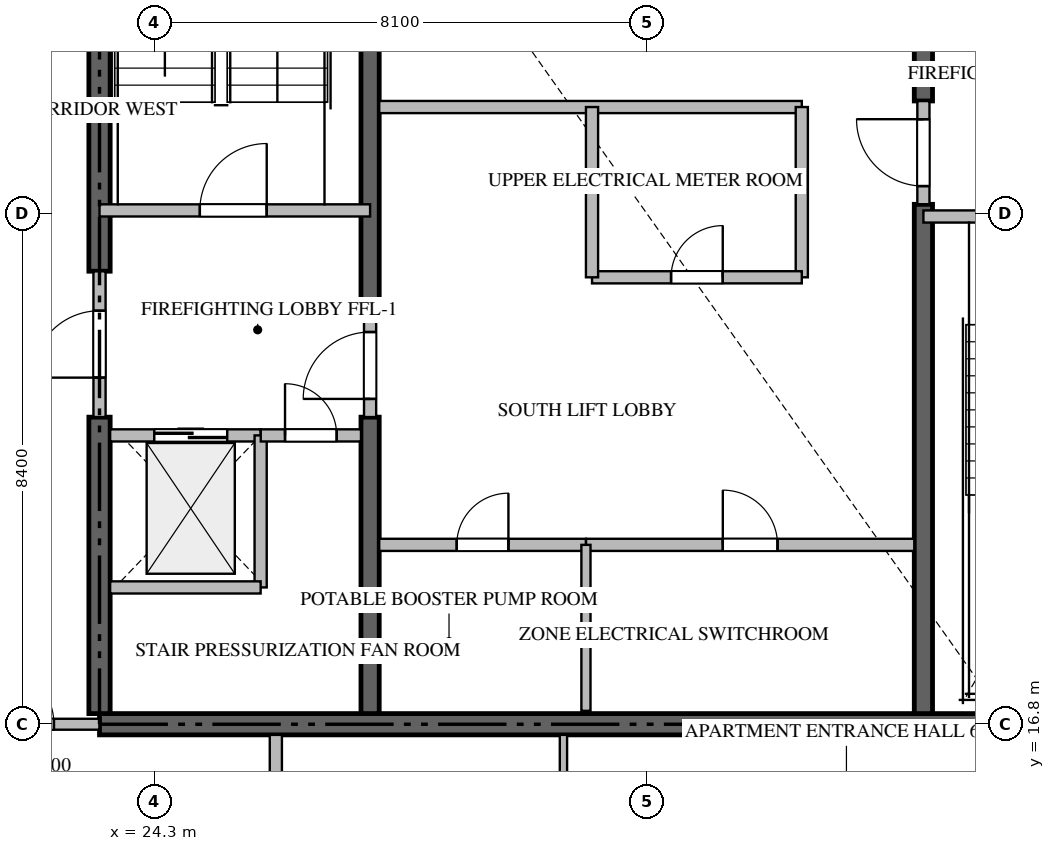
"""IFC4 building model, lengths in metres.
Left out: names, types, materials, properties, quantities, classifications, styles, units other than length and angle.
Written with IfcOpenShell. Run it as: python <this file> out.ifc"""

import sys

from ifc_helpers import new_model, si_unit, direction, frame, frame_2d, origin, place, context, subcontext, project, spatial, rectangle, extrude, source, transform, mapped, element, fill, save


model = new_model("IFC4")
c1 = context("Model", 3, precision=1e-05, world=origin(), true_north=direction((0.0, 1.0)))
c2 = subcontext(c1, "Body", "Model", "MODEL_VIEW")
j1 = project(units=[si_unit("LENGTHUNIT", "METRE"), si_unit("PLANEANGLEUNIT", "RADIAN")], contexts=[c1])
p1 = place(None, origin())
s1 = spatial("IfcSite", under=j1, at=p1, CompositionType="ELEMENT")
p2 = place(p1, origin())
s2 = spatial("IfcBuilding", under=s1, at=p2, CompositionType="ELEMENT")
p3 = place(p2, frame((0.0, 0.0, 241.25)))
s3 = spatial("IfcBuildingStorey", under=s2, at=p3, CompositionType="ELEMENT", Elevation=241.25)
p4 = place(p3, frame((23.4, 16.8, -0.26), z_axis=(0.0, 0.0, 1.0), x_axis=(1.0, 0.0, 0.0)))
e1 = element("IfcWall", 1, at=p4, inside=s3, PredefinedType="SHEAR", context=c2, shape_type="SweptSolid", body=[
    extrude(rectangle(XDim=18.0, YDim=0.35, at=frame_2d((9.0, 0.0))), origin(), (0.0, 0.0, 1.0), 3.848),
])
p5 = place(p3, frame((23.4, 16.975, -0.26), z_axis=(0.0, 0.0, 1.0), x_axis=(0.0, 1.0, 0.0)))
e2 = element("IfcWall", 2, at=p5, inside=s3, PredefinedType="SHEAR", context=c2, shape_type="SweptSolid", body=[
    extrude(rectangle(XDim=4.875, YDim=0.35, at=frame_2d((2.438, 0.0))), origin(), (0.0, 0.0, 1.0), 3.848),
])
p6 = place(p3, frame((23.4, 24.25, -0.26), z_axis=(0.0, 0.0, 1.0), x_axis=(0.0, 1.0, 0.0)))
e3 = element("IfcWall", 3, at=p6, inside=s3, PredefinedType="SHEAR", context=c2, shape_type="SweptSolid", body=[
    extrude(rectangle(XDim=9.175, YDim=0.35, at=frame_2d((4.587, 0.0))), origin(), (0.0, 0.0, 1.0), 3.848),
])
p7 = place(p3, frame((27.85, 16.975, -0.26), z_axis=(0.0, 0.0, 1.0), x_axis=(0.0, 1.0, 0.0)))
e4 = element("IfcWall", 4, at=p7, inside=s3, PredefinedType="SHEAR", context=c2, shape_type="SweptSolid", body=[
    extrude(rectangle(XDim=4.875, YDim=0.3, at=frame_2d((2.438, 0.0))), origin(), (0.0, 0.0, 1.0), 3.848),
])
p8 = place(p3, frame((27.85, 23.55, -0.26), z_axis=(0.0, 0.0, 1.0), x_axis=(0.0, 1.0, 0.0)))
e5 = element("IfcWall", 5, at=p8, inside=s3, PredefinedType="SHEAR", context=c2, shape_type="SweptSolid", body=[
    extrude(rectangle(XDim=9.875, YDim=0.3, at=frame_2d((4.938, 0.0))), origin(), (0.0, 0.0, 1.0), 3.848),
])
p9 = place(p3, frame((36.95, 16.975, -0.26), z_axis=(0.0, 0.0, 1.0), x_axis=(0.0, 1.0, 0.0)))
e6 = element("IfcWall", 6, at=p9, inside=s3, PredefinedType="SHEAR", context=c2, shape_type="SweptSolid", body=[
    extrude(rectangle(XDim=8.375, YDim=0.3, at=frame_2d((4.188, 0.0))), origin(), (0.0, 0.0, 1.0), 3.848),
])
p10 = place(p3, frame((36.95, 27.05, -0.26), z_axis=(0.0, 0.0, 1.0), x_axis=(0.0, 1.0, 0.0)))
e7 = element("IfcWall", 7, at=p10, inside=s3, PredefinedType="SHEAR", context=c2, shape_type="SweptSolid", body=[
    extrude(rectangle(XDim=6.375, YDim=0.3, at=frame_2d((3.188, 0.0))), origin(), (0.0, 0.0, 1.0), 3.848),
])
p11 = place(p3, frame((23.4, 25.25, 0.0), z_axis=(0.0, 0.0, 1.0), x_axis=(1.0, 0.0, 0.0)))
e8 = element("IfcWall", 8, at=p11, inside=s3, PredefinedType="STANDARD", context=c2, shape_type="SweptSolid", body=[
    extrude(rectangle(XDim=4.45, YDim=0.2, at=frame_2d((2.225, 0.0))), origin(), (0.0, 0.0, 1.0), 3.59),
])
p12 = place(p11, frame((1.65, 0.0, 0.0)))
e9 = element("IfcOpeningElement", 9, at=p12, cuts=e8, PredefinedType="OPENING", context=c2, shape_type="SweptSolid", body=[
    extrude(rectangle(XDim=1.1, YDim=2.15, at=frame_2d((0.55, 1.075))), frame((0.0, 0.11, 0.0), z_axis=(0.0, -1.0, 0.0), x_axis=(1.0, 0.0, 0.0)), (0.0, 0.0, 1.0), 0.22),
])
p13 = place(p3, frame((36.95, 25.15, 0.0), z_axis=(0.0, 0.0, 1.0), x_axis=(1.0, 0.0, 0.0)))
e10 = element("IfcWall", 10, at=p13, inside=s3, PredefinedType="STANDARD", context=c2, shape_type="SweptSolid", body=[
    extrude(rectangle(XDim=4.45, YDim=0.2, at=frame_2d((2.225, 0.0))), origin(), (0.0, 0.0, 1.0), 3.59),
])
p14 = place(p13, frame((1.65, 0.0, 0.0)))
e11 = element("IfcOpeningElement", 11, at=p14, cuts=e10, PredefinedType="OPENING", context=c2, shape_type="SweptSolid", body=[
    extrude(rectangle(XDim=1.1, YDim=2.15, at=frame_2d((0.55, 1.075))), frame((0.0, 0.11, 0.0), z_axis=(0.0, -1.0, 0.0), x_axis=(1.0, 0.0, 0.0)), (0.0, 0.0, 1.0), 0.22),
])
p15 = place(p3, frame((23.575, 21.55, 0.0), z_axis=(0.0, 0.0, 1.0), x_axis=(1.0, 0.0, 0.0)))
e12 = element("IfcWall", 12, at=p15, inside=s3, PredefinedType="STANDARD", context=c2, shape_type="SweptSolid", body=[
    extrude(rectangle(XDim=2.475, YDim=0.2, at=frame_2d((1.238, 0.0))), origin(), (0.0, 0.0, 1.0), 3.59),
])
p16 = place(p15, frame((0.725, 0.0, 0.0)))
e13 = element("IfcOpeningElement", 13, at=p16, cuts=e12, PredefinedType="OPENING", context=c2, shape_type="SweptSolid", body=[
    extrude(rectangle(XDim=1.2, YDim=2.2, at=frame_2d((0.6, 1.1))), frame((0.0, 0.11, 0.0), z_axis=(0.0, -1.0, 0.0), x_axis=(1.0, 0.0, 0.0)), (0.0, 0.0, 1.0), 0.22),
])
p17 = place(p3, frame((26.05, 19.05, 0.0), z_axis=(0.0, 0.0, 1.0), x_axis=(0.0, 1.0, 0.0)))
e14 = element("IfcWall", 14, at=p17, inside=s3, PredefinedType="STANDARD", context=c2, shape_type="SweptSolid", body=[
    extrude(rectangle(XDim=2.5, YDim=0.2, at=frame_2d((1.25, 0.0))), origin(), (0.0, 0.0, 1.0), 3.59),
])
p18 = place(p3, frame((23.575, 19.05, 0.0), z_axis=(0.0, 0.0, 1.0), x_axis=(1.0, 0.0, 0.0)))
e15 = element("IfcWall", 15, at=p18, inside=s3, PredefinedType="STANDARD", context=c2, shape_type="SweptSolid", body=[
    extrude(rectangle(XDim=2.475, YDim=0.2, at=frame_2d((1.238, 0.0))), origin(), (0.0, 0.0, 1.0), 3.59),
])
p19 = place(p3, frame((26.052, 21.55, 0.0), z_axis=(0.0, 0.0, 1.0), x_axis=(1.0, 0.0, 0.0)))
e16 = element("IfcWall", 16, at=p19, inside=s3, PredefinedType="STANDARD", context=c2, shape_type="SweptSolid", body=[
    extrude(rectangle(XDim=1.648, YDim=0.2, at=frame_2d((0.824, 0.0))), origin(), (0.0, 0.0, 1.0), 3.59),
])
p20 = place(p19, frame((0.399, 0.0, 0.0)))
e17 = element("IfcOpeningElement", 17, at=p20, cuts=e16, PredefinedType="OPENING", context=c2, shape_type="SweptSolid", body=[
    extrude(rectangle(XDim=0.85, YDim=2.1, at=frame_2d((0.425, 1.05))), frame((0.0, 0.11, 0.0), z_axis=(0.0, -1.0, 0.0), x_axis=(1.0, 0.0, 0.0)), (0.0, 0.0, 1.0), 0.22),
])
p21 = place(p3, frame((23.4, 21.852, 0.0), z_axis=(0.0, 0.0, 1.0), x_axis=(0.0, 1.0, 0.0)))
e18 = element("IfcWall", 18, at=p21, inside=s3, PredefinedType="STANDARD", context=c2, shape_type="SweptSolid", body=[
    extrude(rectangle(XDim=2.396, YDim=0.2, at=frame_2d((1.198, 0.0))), origin(), (0.0, 0.0, 1.0), 3.59),
])
p22 = place(p21, frame((0.648, 0.0, 0.0)))
e19 = element("IfcOpeningElement", 19, at=p22, cuts=e18, PredefinedType="OPENING", context=c2, shape_type="SweptSolid", body=[
    extrude(rectangle(XDim=1.1, YDim=2.15, at=frame_2d((0.55, 1.075))), frame((0.0, 0.11, 0.0), z_axis=(0.0, -1.0, 0.0), x_axis=(1.0, 0.0, 0.0)), (0.0, 0.0, 1.0), 0.22),
])
p23 = place(p3, frame((27.85, 21.852, 0.0), z_axis=(0.0, 0.0, 1.0), x_axis=(0.0, 1.0, 0.0)))
e20 = element("IfcWall", 20, at=p23, inside=s3, PredefinedType="STANDARD", context=c2, shape_type="SweptSolid", body=[
    extrude(rectangle(XDim=1.696, YDim=0.2, at=frame_2d((0.848, 0.0))), origin(), (0.0, 0.0, 1.0), 3.59),
])
p24 = place(p23, frame((0.298, 0.0, 0.0)))
e21 = element("IfcOpeningElement", 21, at=p24, cuts=e20, PredefinedType="OPENING", context=c2, shape_type="SweptSolid", body=[
    extrude(rectangle(XDim=1.1, YDim=2.15, at=frame_2d((0.55, 1.075))), frame((0.0, 0.11, 0.0), z_axis=(0.0, -1.0, 0.0), x_axis=(1.0, 0.0, 0.0)), (0.0, 0.0, 1.0), 0.22),
])
p25 = place(p3, frame((36.95, 25.352, 0.0), z_axis=(0.0, 0.0, 1.0), x_axis=(0.0, 1.0, 0.0)))
e22 = element("IfcWall", 22, at=p25, inside=s3, PredefinedType="STANDARD", context=c2, shape_type="SweptSolid", body=[
    extrude(rectangle(XDim=1.696, YDim=0.2, at=frame_2d((0.848, 0.0))), origin(), (0.0, 0.0, 1.0), 3.59),
])
p26 = place(p25, frame((0.298, 0.0, 0.0)))
e23 = element("IfcOpeningElement", 23, at=p26, cuts=e22, PredefinedType="OPENING", context=c2, shape_type="SweptSolid", body=[
    extrude(rectangle(XDim=1.1, YDim=2.15, at=frame_2d((0.55, 1.075))), frame((0.0, 0.11, 0.0), z_axis=(0.0, -1.0, 0.0), x_axis=(1.0, 0.0, 0.0)), (0.0, 0.0, 1.0), 0.22),
])
p27 = place(p3, frame((28.0, 19.75, 0.0), z_axis=(0.0, 0.0, 1.0), x_axis=(1.0, 0.0, 0.0)))
e24 = element("IfcWall", 24, at=p27, inside=s3, PredefinedType="STANDARD", context=c2, shape_type="SweptSolid", body=[
    extrude(rectangle(XDim=3.4, YDim=0.2, at=frame_2d((1.7, 0.0))), origin(), (0.0, 0.0, 1.0), 3.59),
])
p28 = place(p27, frame((1.275, 0.0, 0.0)))
e25 = element("IfcOpeningElement", 25, at=p28, cuts=e24, PredefinedType="OPENING", context=c2, shape_type="SweptSolid", body=[
    extrude(rectangle(XDim=0.85, YDim=2.1, at=frame_2d((0.425, 1.05))), frame((0.0, 0.11, 0.0), z_axis=(0.0, -1.0, 0.0), x_axis=(1.0, 0.0, 0.0)), (0.0, 0.0, 1.0), 0.22),
])
p29 = place(p3, frame((31.402, 19.75, 0.0), z_axis=(0.0, 0.0, 1.0), x_axis=(1.0, 0.0, 0.0)))
e26 = element("IfcWall", 26, at=p29, inside=s3, PredefinedType="STANDARD", context=c2, shape_type="SweptSolid", body=[
    extrude(rectangle(XDim=5.398, YDim=0.2, at=frame_2d((2.699, 0.0))), origin(), (0.0, 0.0, 1.0), 3.59),
])
p30 = place(p29, frame((2.249, 0.0, 0.0)))
e27 = element("IfcOpeningElement", 27, at=p30, cuts=e26, PredefinedType="OPENING", context=c2, shape_type="SweptSolid", body=[
    extrude(rectangle(XDim=0.9, YDim=2.1, at=frame_2d((0.45, 1.05))), frame((0.0, 0.11, 0.0), z_axis=(0.0, -1.0, 0.0), x_axis=(1.0, 0.0, 0.0)), (0.0, 0.0, 1.0), 0.22),
])
p31 = place(p3, frame((31.4, 17.02, 0.0), z_axis=(0.0, 0.0, 1.0), x_axis=(0.0, 1.0, 0.0)))
e28 = element("IfcWall", 28, at=p31, inside=s3, PredefinedType="PARTITIONING", context=c2, shape_type="SweptSolid", body=[
    extrude(rectangle(XDim=2.73, YDim=0.15, at=frame_2d((1.365, 0.0))), origin(), (0.0, 0.0, 1.0), 3.59),
])
p32 = place(p3, frame((28.0, 26.95, 0.0), z_axis=(0.0, 0.0, 1.0), x_axis=(1.0, 0.0, 0.0)))
e29 = element("IfcWall", 29, at=p32, inside=s3, PredefinedType="STANDARD", context=c2, shape_type="SweptSolid", body=[
    extrude(rectangle(XDim=6.95, YDim=0.2, at=frame_2d((3.475, 0.0))), origin(), (0.0, 0.0, 1.0), 3.59),
])
p33 = place(p3, frame((34.95, 24.15, 0.0), z_axis=(0.0, 0.0, 1.0), x_axis=(0.0, 1.0, 0.0)))
e30 = element("IfcWall", 30, at=p33, inside=s3, PredefinedType="STANDARD", context=c2, shape_type="SweptSolid", body=[
    extrude(rectangle(XDim=2.8, YDim=0.2, at=frame_2d((1.4, 0.0))), origin(), (0.0, 0.0, 1.0), 3.59),
])
p34 = place(p3, frame((31.5, 24.15, 0.0), z_axis=(0.0, 0.0, 1.0), x_axis=(1.0, 0.0, 0.0)))
e31 = element("IfcWall", 31, at=p34, inside=s3, PredefinedType="STANDARD", context=c2, shape_type="SweptSolid", body=[
    extrude(rectangle(XDim=3.45, YDim=0.2, at=frame_2d((1.725, 0.0))), origin(), (0.0, 0.0, 1.0), 3.59),
])
p35 = place(p34, frame((1.3, 0.0, 0.0)))
e32 = element("IfcOpeningElement", 32, at=p35, cuts=e31, PredefinedType="OPENING", context=c2, shape_type="SweptSolid", body=[
    extrude(rectangle(XDim=0.85, YDim=2.1, at=frame_2d((0.425, 1.05))), frame((0.0, 0.11, 0.0), z_axis=(0.0, -1.0, 0.0), x_axis=(1.0, 0.0, 0.0)), (0.0, 0.0, 1.0), 0.22),
])
p36 = place(p3, frame((31.5, 24.15, 0.0), z_axis=(0.0, 0.0, 1.0), x_axis=(0.0, 1.0, 0.0)))
e33 = element("IfcWall", 33, at=p36, inside=s3, PredefinedType="STANDARD", context=c2, shape_type="SweptSolid", body=[
    extrude(rectangle(XDim=2.8, YDim=0.2, at=frame_2d((1.4, 0.0))), origin(), (0.0, 0.0, 1.0), 3.59),
])
p37 = place(p3, frame((26.3, 1.282, 0.0), z_axis=(0.0, 0.0, 1.0), x_axis=(0.0, 1.0, 0.0)))
e34 = element("IfcWall", 34, at=p37, inside=s3, PredefinedType="PARTITIONING", context=c2, shape_type="SweptSolid", body=[
    extrude(rectangle(XDim=15.343, YDim=0.2, at=frame_2d((7.671, 0.0))), origin(), (0.0, 0.0, 1.0), 3.59),
])
p38 = place(p3, frame((20.902, 16.8, 0.0), z_axis=(0.0, 0.0, 1.0), x_axis=(1.0, 0.0, 0.0)))
e35 = element("IfcWall", 35, at=p38, inside=s3, PredefinedType="PARTITIONING", context=c2, shape_type="SweptSolid", body=[
    extrude(rectangle(XDim=2.496, YDim=0.18, at=frame_2d((1.248, 0.0))), origin(), (0.0, 0.0, 1.0), 3.59),
])
p39 = place(p38, frame((0.748, 0.0, 0.0)))
e36 = element("IfcOpeningElement", 36, at=p39, cuts=e35, PredefinedType="OPENING", context=c2, shape_type="SweptSolid", body=[
    extrude(rectangle(XDim=1.0, YDim=2.15, at=frame_2d((0.5, 1.075))), frame((0.0, 0.1, 0.0), z_axis=(0.0, -1.0, 0.0), x_axis=(1.0, 0.0, 0.0)), (0.0, 0.0, 1.0), 0.2),
])
p40 = place(p3, frame((31.03, 14.652, 0.0), z_axis=(0.0, 0.0, 1.0), x_axis=(0.0, 1.0, 0.0)))
e37 = element("IfcWall", 37, at=p40, inside=s3, PredefinedType="PARTITIONING", context=c2, shape_type="SweptSolid", body=[
    extrude(rectangle(XDim=1.973, YDim=0.12, at=frame_2d((0.986, 0.0))), origin(), (0.0, 0.0, 1.0), 3.59),
])
m1 = source(origin(), c2, "Body", "SweptSolid", [
    extrude(rectangle(XDim=1.1, YDim=2.15, at=frame_2d((0.55, 1.075))), frame((0.0, 0.025, 0.0), z_axis=(0.0, -1.0, 0.0), x_axis=(1.0, 0.0, 0.0)), (0.0, 0.0, 1.0), 0.05),
])
p41 = place(p12, origin())
e38 = element("IfcDoor", 38, at=p41, inside=s3, OperationType="SINGLE_SWING_RIGHT", PredefinedType="DOOR", context=c2, shape_type="MappedRepresentation", body=[
    mapped(m1, transform((0.0, 0.0, 0.0), scale=1.0)),
])
fill(e9, e38)
m2 = source(origin(), c2, "Body", "SweptSolid", [
    extrude(rectangle(XDim=1.2, YDim=2.2, at=frame_2d((0.6, 1.1))), frame((0.0, 0.025, 0.0), z_axis=(0.0, -1.0, 0.0), x_axis=(1.0, 0.0, 0.0)), (0.0, 0.0, 1.0), 0.05),
])
p42 = place(p16, origin())
e39 = element("IfcDoor", 39, at=p42, inside=s3, OperationType="DOUBLE_DOOR_SLIDING", PredefinedType="DOOR", context=c2, shape_type="MappedRepresentation", body=[
    mapped(m2, transform((0.0, 0.0, 0.0), scale=1.0)),
])
fill(e13, e39)
m3 = source(origin(), c2, "Body", "SweptSolid", [
    extrude(rectangle(XDim=0.85, YDim=2.1, at=frame_2d((0.425, 1.05))), frame((0.0, 0.025, 0.0), z_axis=(0.0, -1.0, 0.0), x_axis=(1.0, 0.0, 0.0)), (0.0, 0.0, 1.0), 0.05),
])
p43 = place(p20, origin())
e40 = element("IfcDoor", 40, at=p43, inside=s3, OperationType="SINGLE_SWING_LEFT", PredefinedType="DOOR", context=c2, shape_type="MappedRepresentation", body=[
    mapped(m3, transform((0.0, 0.0, 0.0), scale=1.0)),
])
fill(e17, e40)
p44 = place(p22, origin())
e41 = element("IfcDoor", 41, at=p44, inside=s3, OperationType="SINGLE_SWING_LEFT", PredefinedType="DOOR", context=c2, shape_type="MappedRepresentation", body=[
    mapped(m1, transform((0.0, 0.0, 0.0), scale=1.0)),
])
fill(e19, e41)
p45 = place(p24, origin())
e42 = element("IfcDoor", 42, at=p45, inside=s3, OperationType="SINGLE_SWING_LEFT", PredefinedType="DOOR", context=c2, shape_type="MappedRepresentation", body=[
    mapped(m1, transform((0.0, 0.0, 0.0), scale=1.0)),
])
fill(e21, e42)
p46 = place(p26, origin())
e43 = element("IfcDoor", 43, at=p46, inside=s3, OperationType="SINGLE_SWING_RIGHT", PredefinedType="DOOR", context=c2, shape_type="MappedRepresentation", body=[
    mapped(m1, transform((0.0, 0.0, 0.0), scale=1.0)),
])
fill(e23, e43)
p47 = place(p28, origin())
e44 = element("IfcDoor", 44, at=p47, inside=s3, OperationType="SINGLE_SWING_RIGHT", PredefinedType="DOOR", context=c2, shape_type="MappedRepresentation", body=[
    mapped(m3, transform((0.0, 0.0, 0.0), scale=1.0)),
])
fill(e25, e44)
m4 = source(origin(), c2, "Body", "SweptSolid", [
    extrude(rectangle(XDim=0.9, YDim=2.1, at=frame_2d((0.45, 1.05))), frame((0.0, 0.025, 0.0), z_axis=(0.0, -1.0, 0.0), x_axis=(1.0, 0.0, 0.0)), (0.0, 0.0, 1.0), 0.05),
])
p48 = place(p30, origin())
e45 = element("IfcDoor", 45, at=p48, inside=s3, OperationType="SINGLE_SWING_LEFT", PredefinedType="DOOR", context=c2, shape_type="MappedRepresentation", body=[
    mapped(m4, transform((0.0, 0.0, 0.0), scale=1.0)),
])
fill(e27, e45)
p49 = place(p35, origin())
e46 = element("IfcDoor", 46, at=p49, inside=s3, OperationType="SINGLE_SWING_RIGHT", PredefinedType="DOOR", context=c2, shape_type="MappedRepresentation", body=[
    mapped(m3, transform((0.0, 0.0, 0.0), scale=1.0)),
])
fill(e32, e46)
m5 = source(origin(), c2, "Body", "SweptSolid", [
    extrude(rectangle(XDim=1.0, YDim=2.15, at=frame_2d((0.5, 1.075))), frame((0.0, 0.025, 0.0), z_axis=(0.0, -1.0, 0.0), x_axis=(1.0, 0.0, 0.0)), (0.0, 0.0, 1.0), 0.05),
])
p50 = place(p39, origin())
e47 = element("IfcDoor", 47, at=p50, inside=s3, OperationType="SINGLE_SWING_LEFT", PredefinedType="DOOR", context=c2, shape_type="MappedRepresentation", body=[
    mapped(m5, transform((0.0, 0.0, 0.0), scale=1.0)),
])
fill(e36, e47)
save(model, sys.argv[1])
